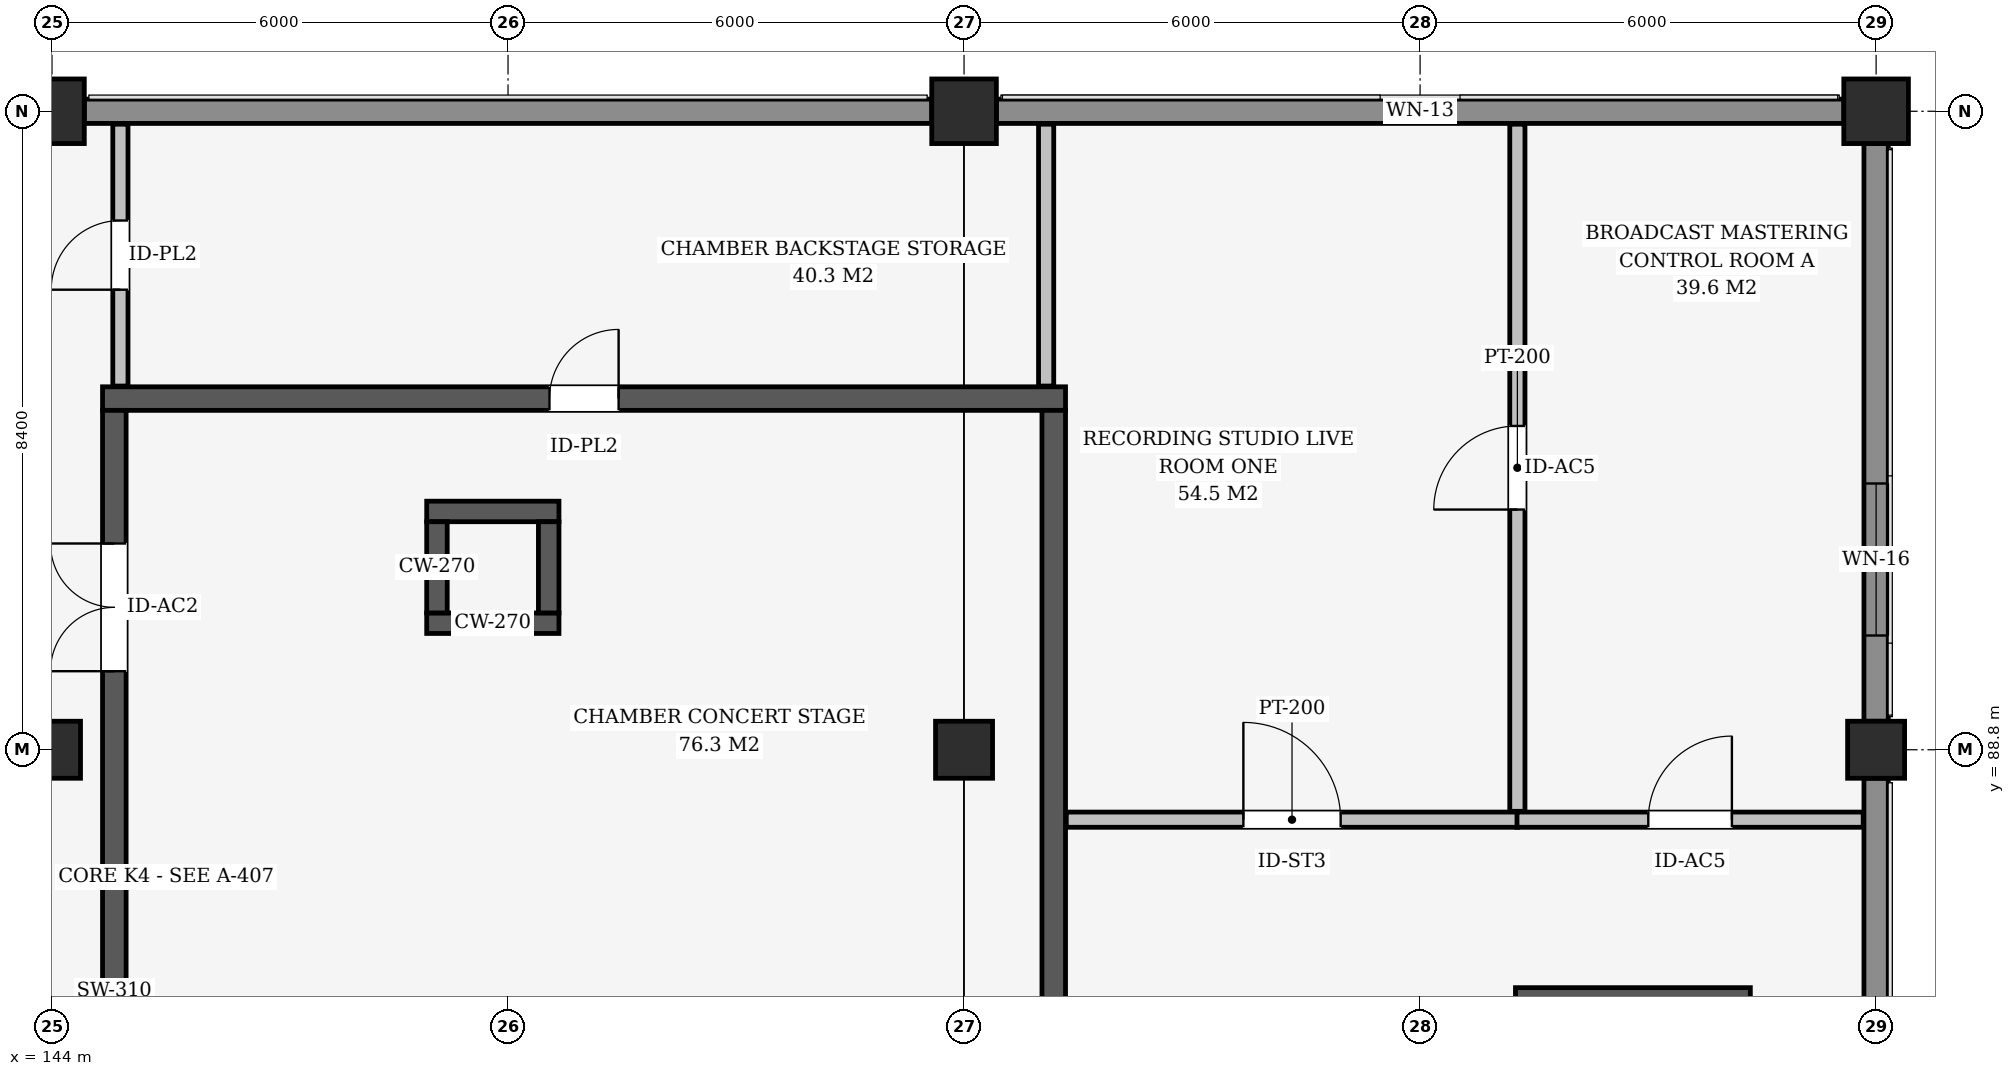
"""IFC4 building model, lengths in metres.
Left out: names, types, materials, properties, quantities, classifications, styles, units other than length and angle.
Written with IfcOpenShell. Run it as: python <this file> out.ifc"""

import sys

from ifc_helpers import new_model, si_unit, direction, frame, frame_2d, origin, origin_2d, place, context, subcontext, project, spatial, rectangle, extrude, element, fill, save


model = new_model("IFC4")
c1 = context("Model", 3, precision=1e-05, world=origin(), true_north=direction((0.0, 1.0)))
c2 = subcontext(c1, "Body", "Model", "MODEL_VIEW")
j1 = project(units=[si_unit("LENGTHUNIT", "METRE"), si_unit("PLANEANGLEUNIT", "RADIAN")], contexts=[c1])
p1 = place(None, origin())
s1 = spatial("IfcSite", under=j1, at=p1, CompositionType="ELEMENT")
p2 = place(p1, origin())
s2 = spatial("IfcBuilding", under=s1, at=p2, CompositionType="ELEMENT")
p3 = place(p2, origin())
s3 = spatial("IfcBuildingStorey", under=s2, at=p3, CompositionType="ELEMENT", Elevation=0.0)
p4 = place(p3, frame((144.0, 88.8, 0.0), z_axis=(0.0, 0.0, 1.0), x_axis=(1.0, 0.0, 0.0)))
e1 = element("IfcColumn", 1, at=p4, inside=s3, PredefinedType="COLUMN", context=c2, shape_type="SweptSolid", body=[
    extrude(rectangle(XDim=0.75, YDim=0.75, at=origin_2d()), origin(), (0.0, 0.0, 1.0), 4.8),
])
p5 = place(p3, frame((144.0, 97.2, 0.0), z_axis=(0.0, 0.0, 1.0), x_axis=(1.0, 0.0, 0.0)))
e2 = element("IfcColumn", 2, at=p5, inside=s3, PredefinedType="COLUMN", context=c2, shape_type="SweptSolid", body=[
    extrude(rectangle(XDim=0.85, YDim=0.85, at=origin_2d()), origin(), (0.0, 0.0, 1.0), 4.8),
])
p6 = place(p3, frame((156.0, 88.8, 0.0), z_axis=(0.0, 0.0, 1.0), x_axis=(1.0, 0.0, 0.0)))
e3 = element("IfcColumn", 3, at=p6, inside=s3, PredefinedType="COLUMN", context=c2, shape_type="SweptSolid", body=[
    extrude(rectangle(XDim=0.75, YDim=0.75, at=origin_2d()), origin(), (0.0, 0.0, 1.0), 4.8),
])
p7 = place(p3, frame((156.0, 97.2, 0.0), z_axis=(0.0, 0.0, 1.0), x_axis=(1.0, 0.0, 0.0)))
e4 = element("IfcColumn", 4, at=p7, inside=s3, PredefinedType="COLUMN", context=c2, shape_type="SweptSolid", body=[
    extrude(rectangle(XDim=0.85, YDim=0.85, at=origin_2d()), origin(), (0.0, 0.0, 1.0), 4.8),
])
p8 = place(p3, frame((168.0, 88.8, 0.0), z_axis=(0.0, 0.0, 1.0), x_axis=(1.0, 0.0, 0.0)))
e5 = element("IfcColumn", 5, at=p8, inside=s3, PredefinedType="COLUMN", context=c2, shape_type="SweptSolid", body=[
    extrude(rectangle(XDim=0.75, YDim=0.75, at=origin_2d()), origin(), (0.0, 0.0, 1.0), 4.8),
])
p9 = place(p3, frame((168.0, 97.2, 0.0), z_axis=(0.0, 0.0, 1.0), x_axis=(1.0, 0.0, 0.0)))
e6 = element("IfcColumn", 6, at=p9, inside=s3, PredefinedType="COLUMN", context=c2, shape_type="SweptSolid", body=[
    extrude(rectangle(XDim=0.85, YDim=0.85, at=origin_2d()), origin(), (0.0, 0.0, 1.0), 4.8),
])
p10 = place(p3, frame((144.665, 93.42, 0.0), z_axis=(0.0, 0.0, 1.0), x_axis=(1.0, 0.0, 0.0)))
e7 = element("IfcWall", 7, at=p10, inside=s3, PredefinedType="SHEAR", context=c2, shape_type="SweptSolid", body=[
    extrude(rectangle(XDim=12.67, YDim=0.31, at=frame_2d((6.335, 0.0))), origin(), (0.0, 0.0, 1.0), 4.5),
])
p11 = place(p10, frame((5.88, 0.0, 0.0)))
e8 = element("IfcOpeningElement", 8, at=p11, cuts=e7, PredefinedType="OPENING", context=c2, shape_type="SweptSolid", body=[
    extrude(rectangle(XDim=0.91, YDim=2.1, at=frame_2d((0.455, 1.05))), frame((0.0, 0.165, 0.0), z_axis=(0.0, -1.0, 0.0), x_axis=(1.0, 0.0, 0.0)), (0.0, 0.0, 1.0), 0.33),
])
p12 = place(p3, frame((144.82, 77.375, 0.0), z_axis=(0.0, 0.0, 1.0), x_axis=(0.0, 1.0, 0.0)))
e9 = element("IfcWall", 9, at=p12, inside=s3, PredefinedType="SHEAR", context=c2, shape_type="SweptSolid", body=[
    extrude(rectangle(XDim=15.89, YDim=0.31, at=frame_2d((7.945, 0.0))), origin(), (0.0, 0.0, 1.0), 4.5),
])
p13 = place(p12, frame((0.895, 0.0, 0.0)))
e10 = element("IfcOpeningElement", 10, at=p13, cuts=e9, PredefinedType="OPENING", context=c2, shape_type="SweptSolid", body=[
    extrude(rectangle(XDim=1.68, YDim=2.32, at=frame_2d((0.84, 1.16))), frame((0.0, 0.165, 0.0), z_axis=(0.0, -1.0, 0.0), x_axis=(1.0, 0.0, 0.0)), (0.0, 0.0, 1.0), 0.33),
])
p14 = place(p12, frame((5.365, 0.0, 0.0)))
e11 = element("IfcOpeningElement", 11, at=p14, cuts=e9, PredefinedType="OPENING", context=c2, shape_type="SweptSolid", body=[
    extrude(rectangle(XDim=1.68, YDim=2.32, at=frame_2d((0.84, 1.16))), frame((0.0, 0.165, 0.0), z_axis=(0.0, -1.0, 0.0), x_axis=(1.0, 0.0, 0.0)), (0.0, 0.0, 1.0), 0.33),
])
p15 = place(p12, frame((12.458, 0.0, 0.0)))
e12 = element("IfcOpeningElement", 12, at=p15, cuts=e9, PredefinedType="OPENING", context=c2, shape_type="SweptSolid", body=[
    extrude(rectangle(XDim=1.68, YDim=2.32, at=frame_2d((0.84, 1.16))), frame((0.0, 0.165, 0.0), z_axis=(0.0, -1.0, 0.0), x_axis=(1.0, 0.0, 0.0)), (0.0, 0.0, 1.0), 0.33),
])
p16 = place(p3, frame((157.18, 77.375, 0.0), z_axis=(0.0, 0.0, 1.0), x_axis=(0.0, 1.0, 0.0)))
e13 = element("IfcWall", 13, at=p16, inside=s3, PredefinedType="SHEAR", context=c2, shape_type="SweptSolid", body=[
    extrude(rectangle(XDim=15.89, YDim=0.31, at=frame_2d((7.945, 0.0))), origin(), (0.0, 0.0, 1.0), 4.5),
])
p17 = place(p16, frame((3.795, 0.0, 0.0)))
e14 = element("IfcOpeningElement", 14, at=p17, cuts=e13, PredefinedType="OPENING", context=c2, shape_type="SweptSolid", body=[
    extrude(rectangle(XDim=1.68, YDim=2.32, at=frame_2d((0.84, 1.16))), frame((0.0, 0.165, 0.0), z_axis=(0.0, -1.0, 0.0), x_axis=(1.0, 0.0, 0.0)), (0.0, 0.0, 1.0), 0.33),
])
p18 = place(p3, frame((144.425, 97.2, 0.0), z_axis=(0.0, 0.0, 1.0), x_axis=(1.0, 0.0, 0.0)))
e15 = element("IfcWall", 15, at=p18, inside=s3, PredefinedType="SOLIDWALL", context=c2, shape_type="SweptSolid", body=[
    extrude(rectangle(XDim=11.15, YDim=0.32, at=frame_2d((5.575, 0.0))), origin(), (0.0, 0.0, 1.0), 3.63),
])
p19 = place(p3, frame((156.425, 97.2, 0.0), z_axis=(0.0, 0.0, 1.0), x_axis=(1.0, 0.0, 0.0)))
e16 = element("IfcWall", 16, at=p19, inside=s3, PredefinedType="SOLIDWALL", context=c2, shape_type="SweptSolid", body=[
    extrude(rectangle(XDim=11.15, YDim=0.32, at=frame_2d((5.575, 0.0))), origin(), (0.0, 0.0, 1.0), 3.63),
])
p20 = place(p19, frame((5.15, 0.0, 0.6)))
e17 = element("IfcOpeningElement", 17, at=p20, cuts=e16, PredefinedType="OPENING", context=c2, shape_type="SweptSolid", body=[
    extrude(rectangle(XDim=0.85, YDim=2.35, at=frame_2d((0.425, 1.175))), frame((0.0, 0.17, 0.0), z_axis=(0.0, -1.0, 0.0), x_axis=(1.0, 0.0, 0.0)), (0.0, 0.0, 1.0), 0.34),
])
p21 = place(p3, frame((168.0, 88.425, 0.0), z_axis=(0.0, 0.0, 1.0), x_axis=(0.0, -1.0, 0.0)))
e18 = element("IfcWall", 18, at=p21, inside=s3, PredefinedType="SOLIDWALL", context=c2, shape_type="SweptSolid", body=[
    extrude(rectangle(XDim=5.25, YDim=0.32, at=frame_2d((2.625, 0.0))), origin(), (0.0, 0.0, 1.0), 3.908),
])
p22 = place(p3, frame((168.0, 96.775, 0.0), z_axis=(0.0, 0.0, 1.0), x_axis=(0.0, -1.0, 0.0)))
e19 = element("IfcWall", 19, at=p22, inside=s3, PredefinedType="SOLIDWALL", context=c2, shape_type="SweptSolid", body=[
    extrude(rectangle(XDim=7.6, YDim=0.32, at=frame_2d((3.8, 0.0))), origin(), (0.0, 0.0, 1.0), 3.908),
])
p23 = place(p22, frame((4.472, 0.0, 0.85)))
e20 = element("IfcOpeningElement", 20, at=p23, cuts=e19, PredefinedType="OPENING", context=c2, shape_type="SweptSolid", body=[
    extrude(rectangle(XDim=2.0, YDim=1.85, at=frame_2d((1.0, 0.925))), frame((0.0, 0.17, 0.0), z_axis=(0.0, -1.0, 0.0), x_axis=(1.0, 0.0, 0.0)), (0.0, 0.0, 1.0), 0.34),
])
for number, where, z_axis, x_axis in (
    (21, (148.93, 90.465, 0.0), (0.0, 0.0, 1.0), (1.0, 0.0, 0.0)),
    (22, (148.93, 91.935, 0.0), (0.0, 0.0, 1.0), (1.0, 0.0, 0.0)),
):
    element("IfcWall", number, at=place(p3, frame(where, z_axis=z_axis, x_axis=x_axis)), inside=s3, PredefinedType="SHEAR", context=c2, shape_type="SweptSolid", body=[
        extrude(rectangle(XDim=1.74, YDim=0.27, at=frame_2d((0.87, 0.0))), origin(), (0.0, 0.0, 1.0), 4.5),
    ])
for number, where, z_axis, x_axis in (
    (23, (149.065, 90.6, 0.0), (0.0, 0.0, 1.0), (0.0, 1.0, 0.0)),
    (24, (150.535, 90.6, 0.0), (0.0, 0.0, 1.0), (0.0, 1.0, 0.0)),
):
    element("IfcWall", number, at=place(p3, frame(where, z_axis=z_axis, x_axis=x_axis)), inside=s3, PredefinedType="SHEAR", context=c2, shape_type="SweptSolid", body=[
        extrude(rectangle(XDim=1.2, YDim=0.27, at=frame_2d((0.6, 0.0))), origin(), (0.0, 0.0, 1.0), 4.5),
    ])
p24 = place(p3, frame((163.255, 85.535, 0.0), z_axis=(0.0, 0.0, 1.0), x_axis=(1.0, 0.0, 0.0)))
e25 = element("IfcWall", 25, at=p24, inside=s3, PredefinedType="SHEAR", context=c2, shape_type="SweptSolid", body=[
    extrude(rectangle(XDim=3.09, YDim=0.27, at=frame_2d((1.545, 0.0))), origin(), (0.0, 0.0, 1.0), 4.54),
])
p25 = place(p3, frame((144.9, 93.585, 0.0), z_axis=(0.0, 0.0, 1.0), x_axis=(0.0, 1.0, 0.0)))
e26 = element("IfcWall", 26, at=p25, inside=s3, PredefinedType="PARTITIONING", context=c2, shape_type="SweptSolid", body=[
    extrude(rectangle(XDim=3.445, YDim=0.2, at=frame_2d((1.723, 0.0))), origin(), (0.0, 0.0, 1.0), 4.8),
])
p26 = place(p25, frame((1.268, 0.0, 0.0)))
e27 = element("IfcOpeningElement", 27, at=p26, cuts=e26, PredefinedType="OPENING", context=c2, shape_type="SweptSolid", body=[
    extrude(rectangle(XDim=0.91, YDim=2.1, at=frame_2d((0.455, 1.05))), frame((0.0, 0.11, 0.0), z_axis=(0.0, -1.0, 0.0), x_axis=(1.0, 0.0, 0.0)), (0.0, 0.0, 1.0), 0.22),
])
p27 = place(p3, frame((157.08, 93.585, 0.0), z_axis=(0.0, 0.0, 1.0), x_axis=(0.0, 1.0, 0.0)))
e28 = element("IfcWall", 28, at=p27, inside=s3, PredefinedType="PARTITIONING", context=c2, shape_type="SweptSolid", body=[
    extrude(rectangle(XDim=3.445, YDim=0.2, at=frame_2d((1.723, 0.0))), origin(), (0.0, 0.0, 1.0), 4.063),
])
p28 = place(p3, frame((157.345, 87.88, 0.0), z_axis=(0.0, 0.0, 1.0), x_axis=(1.0, 0.0, 0.0)))
e29 = element("IfcWall", 29, at=p28, inside=s3, PredefinedType="PARTITIONING", context=c2, shape_type="SweptSolid", body=[
    extrude(rectangle(XDim=5.94, YDim=0.2, at=frame_2d((2.97, 0.0))), origin(), (0.0, 0.0, 1.0), 4.52),
])
p29 = place(p28, frame((2.33, 0.0, 0.0)))
e30 = element("IfcOpeningElement", 30, at=p29, cuts=e29, PredefinedType="OPENING", context=c2, shape_type="SweptSolid", body=[
    extrude(rectangle(XDim=1.28, YDim=2.26, at=frame_2d((0.64, 1.13))), frame((0.0, 0.11, 0.0), z_axis=(0.0, -1.0, 0.0), x_axis=(1.0, 0.0, 0.0)), (0.0, 0.0, 1.0), 0.22),
])
p30 = place(p3, frame((163.275, 87.88, 0.0), z_axis=(0.0, 0.0, 1.0), x_axis=(1.0, 0.0, 0.0)))
e31 = element("IfcWall", 31, at=p30, inside=s3, PredefinedType="PARTITIONING", context=c2, shape_type="SweptSolid", body=[
    extrude(rectangle(XDim=4.555, YDim=0.2, at=frame_2d((2.278, 0.0))), origin(), (0.0, 0.0, 1.0), 4.52),
])
p31 = place(p30, frame((1.728, 0.0, 0.0)))
e32 = element("IfcOpeningElement", 32, at=p31, cuts=e31, PredefinedType="OPENING", context=c2, shape_type="SweptSolid", body=[
    extrude(rectangle(XDim=1.1, YDim=2.26, at=frame_2d((0.55, 1.13))), frame((0.0, 0.11, 0.0), z_axis=(0.0, -1.0, 0.0), x_axis=(1.0, 0.0, 0.0)), (0.0, 0.0, 1.0), 0.22),
])
p32 = place(p3, frame((163.28, 87.99, 0.0), z_axis=(0.0, 0.0, 1.0), x_axis=(0.0, 1.0, 0.0)))
e33 = element("IfcWall", 33, at=p32, inside=s3, PredefinedType="PARTITIONING", context=c2, shape_type="SweptSolid", body=[
    extrude(rectangle(XDim=9.04, YDim=0.2, at=frame_2d((4.52, 0.0))), origin(), (0.0, 0.0, 1.0), 3.984),
])
p33 = place(p32, frame((3.97, 0.0, 0.0)))
e34 = element("IfcOpeningElement", 34, at=p33, cuts=e33, PredefinedType="OPENING", context=c2, shape_type="SweptSolid", body=[
    extrude(rectangle(XDim=1.1, YDim=2.26, at=frame_2d((0.55, 1.13))), frame((0.0, 0.11, 0.0), z_axis=(0.0, -1.0, 0.0), x_axis=(1.0, 0.0, 0.0)), (0.0, 0.0, 1.0), 0.22),
])
p34 = place(p20, origin())
e35 = element("IfcWindow", 35, at=p34, inside=s3, PartitioningType="SINGLE_PANEL", PredefinedType="WINDOW", context=c2, shape_type="SweptSolid", body=[
    extrude(rectangle(XDim=0.85, YDim=2.35, at=frame_2d((0.425, 1.175))), frame((0.0, 0.03, 0.0), z_axis=(0.0, -1.0, 0.0), x_axis=(1.0, 0.0, 0.0)), (0.0, 0.0, 1.0), 0.06),
])
fill(e17, e35)
p35 = place(p23, origin())
e36 = element("IfcWindow", 36, at=p35, inside=s3, PartitioningType="SINGLE_PANEL", PredefinedType="WINDOW", context=c2, shape_type="SweptSolid", body=[
    extrude(rectangle(XDim=2.0, YDim=1.85, at=frame_2d((1.0, 0.925))), frame((0.0, 0.03, 0.0), z_axis=(0.0, -1.0, 0.0), x_axis=(1.0, 0.0, 0.0)), (0.0, 0.0, 1.0), 0.06),
])
fill(e20, e36)
p36 = place(p15, origin())
e37 = element("IfcDoor", 37, at=p36, inside=s3, OperationType="DOUBLE_DOOR_SINGLE_SWING", PredefinedType="DOOR", context=c2, shape_type="SweptSolid", body=[
    extrude(rectangle(XDim=1.68, YDim=2.32, at=frame_2d((0.84, 1.16))), frame((0.0, 0.025, 0.0), z_axis=(0.0, -1.0, 0.0), x_axis=(1.0, 0.0, 0.0)), (0.0, 0.0, 1.0), 0.05),
])
fill(e12, e37)
p37 = place(p11, origin())
e38 = element("IfcDoor", 38, at=p37, inside=s3, OperationType="SINGLE_SWING_RIGHT", PredefinedType="DOOR", context=c2, shape_type="SweptSolid", body=[
    extrude(rectangle(XDim=0.91, YDim=2.1, at=frame_2d((0.455, 1.05))), frame((0.0, 0.025, 0.0), z_axis=(0.0, -1.0, 0.0), x_axis=(1.0, 0.0, 0.0)), (0.0, 0.0, 1.0), 0.05),
])
fill(e8, e38)
p38 = place(p26, origin())
e39 = element("IfcDoor", 39, at=p38, inside=s3, OperationType="SINGLE_SWING_LEFT", PredefinedType="DOOR", context=c2, shape_type="SweptSolid", body=[
    extrude(rectangle(XDim=0.91, YDim=2.1, at=frame_2d((0.455, 1.05))), frame((0.0, 0.025, 0.0), z_axis=(0.0, -1.0, 0.0), x_axis=(1.0, 0.0, 0.0)), (0.0, 0.0, 1.0), 0.05),
])
fill(e27, e39)
p39 = place(p29, origin())
e40 = element("IfcDoor", 40, at=p39, inside=s3, OperationType="SINGLE_SWING_LEFT", PredefinedType="DOOR", context=c2, shape_type="SweptSolid", body=[
    extrude(rectangle(XDim=1.28, YDim=2.26, at=frame_2d((0.64, 1.13))), frame((0.0, 0.025, 0.0), z_axis=(0.0, -1.0, 0.0), x_axis=(1.0, 0.0, 0.0)), (0.0, 0.0, 1.0), 0.05),
])
fill(e30, e40)
p40 = place(p31, origin())
e41 = element("IfcDoor", 41, at=p40, inside=s3, OperationType="SINGLE_SWING_RIGHT", PredefinedType="DOOR", context=c2, shape_type="SweptSolid", body=[
    extrude(rectangle(XDim=1.1, YDim=2.26, at=frame_2d((0.55, 1.13))), frame((0.0, 0.025, 0.0), z_axis=(0.0, -1.0, 0.0), x_axis=(1.0, 0.0, 0.0)), (0.0, 0.0, 1.0), 0.05),
])
fill(e32, e41)
p41 = place(p33, origin())
e42 = element("IfcDoor", 42, at=p41, inside=s3, OperationType="SINGLE_SWING_LEFT", PredefinedType="DOOR", context=c2, shape_type="SweptSolid", body=[
    extrude(rectangle(XDim=1.1, YDim=2.26, at=frame_2d((0.55, 1.13))), frame((0.0, 0.025, 0.0), z_axis=(0.0, -1.0, 0.0), x_axis=(1.0, 0.0, 0.0)), (0.0, 0.0, 1.0), 0.05),
])
fill(e34, e42)
save(model, sys.argv[1])
